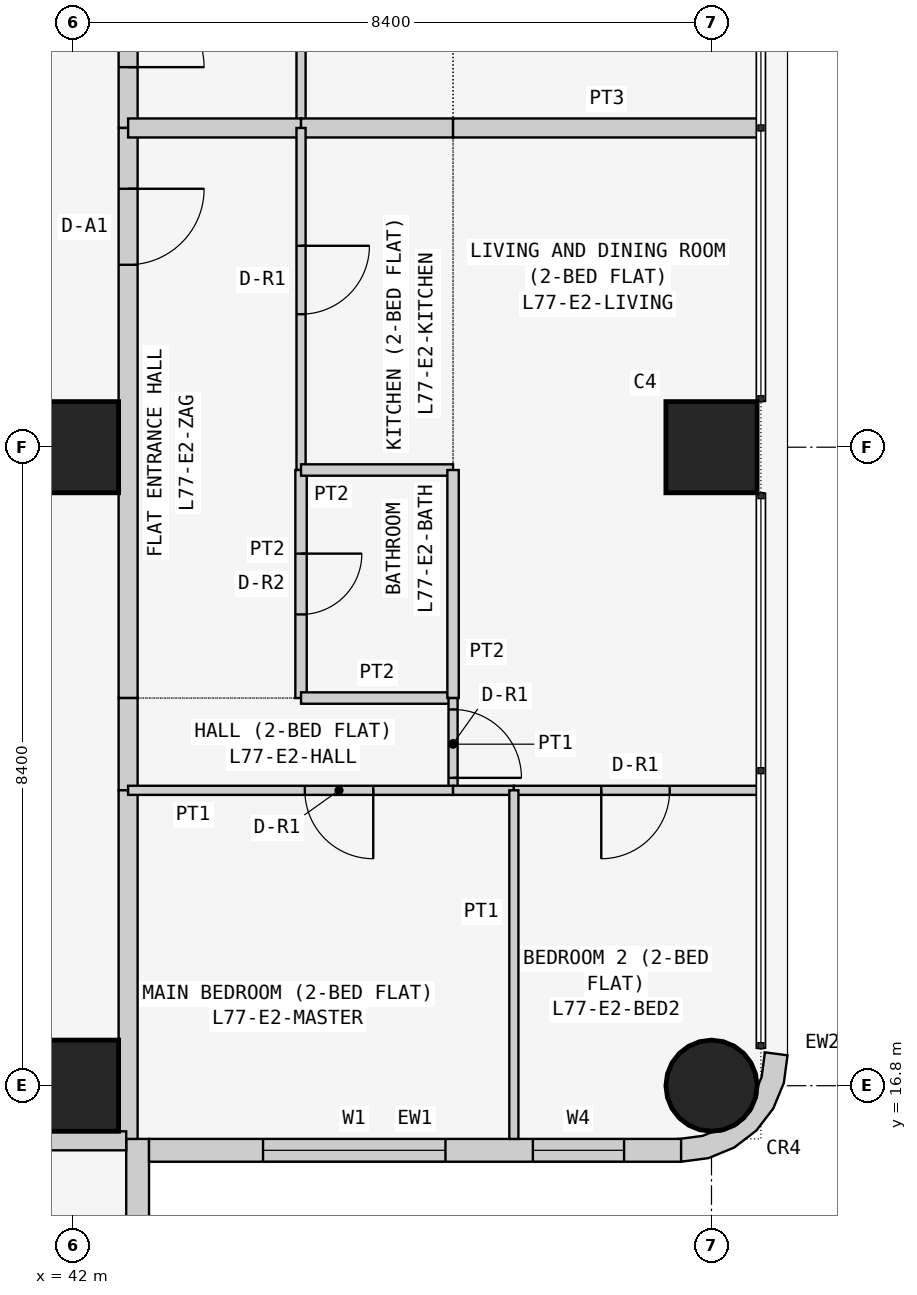
"""IFC4 building model, lengths in metres.
Left out: names, types, materials, properties, quantities, classifications, styles, units other than length and angle.
Written with IfcOpenShell. Run it as: python <this file> out.ifc"""

import sys

from ifc_helpers import new_model, si_unit, direction, frame, frame_2d, origin, origin_2d, place, context, subcontext, project, spatial, polyline, rectangle, circle, outline, extrude, element, fill, save


model = new_model("IFC4")
c1 = context("Model", 3, precision=1e-05, world=origin(), true_north=direction((0.0, 1.0)))
c2 = subcontext(c1, "Body", "Model", "MODEL_VIEW")
j1 = project(units=[si_unit("LENGTHUNIT", "METRE"), si_unit("PLANEANGLEUNIT", "RADIAN")], contexts=[c1])
p1 = place(None, origin())
s1 = spatial("IfcSite", under=j1, at=p1, CompositionType="ELEMENT")
p2 = place(p1, origin())
s2 = spatial("IfcBuilding", under=s1, at=p2, CompositionType="ELEMENT")
p3 = place(p2, frame((0.0, 0.0, 293.7)))
s3 = spatial("IfcBuildingStorey", under=s2, at=p3, CompositionType="ELEMENT", Elevation=293.7)
for number, where, z_axis, x_axis in (
    (1, (42.0, 16.8, 0.0), (0.0, 0.0, 1.0), (1.0, 0.0, 0.0)),
    (2, (42.0, 25.2, 0.0), (0.0, 0.0, 1.0), (1.0, 0.0, 0.0)),
):
    element("IfcColumn", number, at=place(p3, frame(where, z_axis=z_axis, x_axis=x_axis)), inside=s3, PredefinedType="COLUMN", context=c2, shape_type="SweptSolid", body=[
        extrude(rectangle(XDim=1.2, YDim=1.2, at=origin_2d()), origin(), (0.0, 0.0, 1.0), 3.6),
    ])
p4 = place(p3, frame((50.4, 16.8, 0.0), z_axis=(0.0, 0.0, 1.0), x_axis=(1.0, 0.0, 0.0)))
e3 = element("IfcColumn", 3, at=p4, inside=s3, PredefinedType="COLUMN", context=c2, shape_type="SweptSolid", body=[
    extrude(circle(Radius=0.6, at=origin_2d()), origin(), (0.0, 0.0, 1.0), 3.6),
])
p5 = place(p3, frame((50.4, 25.2, 0.0), z_axis=(0.0, 0.0, 1.0), x_axis=(1.0, 0.0, 0.0)))
e4 = element("IfcColumn", 4, at=p5, inside=s3, PredefinedType="COLUMN", context=c2, shape_type="SweptSolid", body=[
    extrude(rectangle(XDim=1.2, YDim=1.2, at=origin_2d()), origin(), (0.0, 0.0, 1.0), 3.6),
])
p6 = place(p3, frame((42.85, 8.8, 0.0), z_axis=(0.0, 0.0, 1.0), x_axis=(0.0, 1.0, 0.0)))
e5 = element("IfcWall", 5, at=p6, inside=s3, PredefinedType="SOLIDWALL", context=c2, shape_type="SweptSolid", body=[
    extrude(rectangle(XDim=7.3, YDim=0.3, at=frame_2d((3.65, 0.0))), origin(), (0.0, 0.0, 1.0), 3.45),
])
p7 = place(p6, frame((3.1, 0.0, 0.9)))
e6 = element("IfcOpeningElement", 6, at=p7, cuts=e5, PredefinedType="OPENING", context=c2, shape_type="SweptSolid", body=[
    extrude(rectangle(XDim=2.4, YDim=1.5, at=frame_2d((1.2, 0.75))), frame((0.0, 0.16, 0.0), z_axis=(0.0, -1.0, 0.0), x_axis=(1.0, 0.0, 0.0)), (0.0, 0.0, 1.0), 0.32),
])
p8 = place(p6, frame((0.75, 0.0, 0.9)))
e7 = element("IfcOpeningElement", 7, at=p8, cuts=e5, PredefinedType="OPENING", context=c2, shape_type="SweptSolid", body=[
    extrude(rectangle(XDim=1.2, YDim=1.5, at=frame_2d((0.6, 0.75))), frame((0.0, 0.16, 0.0), z_axis=(0.0, -1.0, 0.0), x_axis=(1.0, 0.0, 0.0)), (0.0, 0.0, 1.0), 0.32),
])
p9 = place(p3, frame((43.0, 15.95, 0.0), z_axis=(0.0, 0.0, 1.0), x_axis=(1.0, 0.0, 0.0)))
e8 = element("IfcWall", 8, at=p9, inside=s3, PredefinedType="SOLIDWALL", context=c2, shape_type="SweptSolid", body=[
    extrude(rectangle(XDim=7.0, YDim=0.3, at=frame_2d((3.5, 0.0))), origin(), (0.0, 0.0, 1.0), 3.45),
])
p10 = place(p9, frame((1.5, 0.0, 0.9)))
e9 = element("IfcOpeningElement", 9, at=p10, cuts=e8, PredefinedType="OPENING", context=c2, shape_type="SweptSolid", body=[
    extrude(rectangle(XDim=2.4, YDim=1.5, at=frame_2d((1.2, 0.75))), frame((0.0, 0.16, 0.0), z_axis=(0.0, -1.0, 0.0), x_axis=(1.0, 0.0, 0.0)), (0.0, 0.0, 1.0), 0.32),
])
p11 = place(p9, frame((5.05, 0.0, 0.9)))
e10 = element("IfcOpeningElement", 10, at=p11, cuts=e8, PredefinedType="OPENING", context=c2, shape_type="SweptSolid", body=[
    extrude(rectangle(XDim=1.2, YDim=1.5, at=frame_2d((0.6, 0.75))), frame((0.0, 0.16, 0.0), z_axis=(0.0, -1.0, 0.0), x_axis=(1.0, 0.0, 0.0)), (0.0, 0.0, 1.0), 0.32),
])
p12 = place(p3, frame((50.038, 16.224, 0.0), z_axis=(0.0, 0.0, 1.0), x_axis=(0.707106781187, -0.707106781187, 0.0)))
e11 = element("IfcWall", 11, at=p12, inside=s3, PredefinedType="SOLIDWALL", context=c2, shape_type="SweptSolid", body=[
    extrude(outline(polyline([(0.047, 1.455), (0.233, 1.212), (0.292, 1.069), (0.358, 1.003), (0.449, 0.782), (0.449, 0.543), (0.358, 0.322), (0.292, 0.257), (0.233, 0.114), (0.047, -0.129), (0.033, -0.143), (0.273, -0.327), (0.495, -0.037), (0.635, 0.301), (0.683, 0.663), (0.635, 1.025), (0.495, 1.363), (0.273, 1.653), (0.033, 1.469), (0.047, 1.455)])), origin(), (0.0, 0.0, 1.0), 3.45),
])
p13 = place(p3, frame((42.725, 36.9, 0.0), z_axis=(0.0, 0.0, 1.0), x_axis=(0.0, -1.0, 0.0)))
e12 = element("IfcWall", 12, at=p13, inside=s3, PredefinedType="PARTITIONING", context=c2, shape_type="SweptSolid", body=[
    extrude(rectangle(XDim=7.5, YDim=0.25, at=frame_2d((3.75, 0.0))), origin(), (0.0, 0.0, 1.0), 3.45),
])
p14 = place(p13, frame((5.7, 0.0, 0.0)))
e13 = element("IfcOpeningElement", 13, at=p14, cuts=e12, PredefinedType="OPENING", context=c2, shape_type="SweptSolid", body=[
    extrude(rectangle(XDim=1.0, YDim=2.1, at=frame_2d((0.5, 1.05))), frame((0.0, 0.135, 0.0), z_axis=(0.0, -1.0, 0.0), x_axis=(1.0, 0.0, 0.0)), (0.0, 0.0, 1.0), 0.27),
])
p15 = place(p3, frame((42.725, 29.4, 0.0), z_axis=(0.0, 0.0, 1.0), x_axis=(0.0, -1.0, 0.0)))
e14 = element("IfcWall", 14, at=p15, inside=s3, PredefinedType="PARTITIONING", context=c2, shape_type="SweptSolid", body=[
    extrude(rectangle(XDim=7.5, YDim=0.25, at=frame_2d((3.75, 0.0))), origin(), (0.0, 0.0, 1.0), 3.45),
])
p16 = place(p15, frame((0.8, 0.0, 0.0)))
e15 = element("IfcOpeningElement", 15, at=p16, cuts=e14, PredefinedType="OPENING", context=c2, shape_type="SweptSolid", body=[
    extrude(rectangle(XDim=1.0, YDim=2.1, at=frame_2d((0.5, 1.05))), frame((0.0, 0.135, 0.0), z_axis=(0.0, -1.0, 0.0), x_axis=(1.0, 0.0, 0.0)), (0.0, 0.0, 1.0), 0.27),
])
p17 = place(p3, frame((42.725, 21.9, 0.0), z_axis=(0.0, 0.0, 1.0), x_axis=(0.0, -1.0, 0.0)))
e16 = element("IfcWall", 16, at=p17, inside=s3, PredefinedType="PARTITIONING", context=c2, shape_type="SweptSolid", body=[
    extrude(rectangle(XDim=1.214, YDim=0.25, at=frame_2d((0.607, 0.0))), origin(), (0.0, 0.0, 1.0), 3.45),
])
p18 = place(p3, frame((42.725, 20.686, 0.0), z_axis=(0.0, 0.0, 1.0), x_axis=(0.0, -1.0, 0.0)))
e17 = element("IfcWall", 17, at=p18, inside=s3, PredefinedType="PARTITIONING", context=c2, shape_type="SweptSolid", body=[
    extrude(rectangle(XDim=4.586, YDim=0.25, at=frame_2d((2.293, 0.0))), origin(), (0.0, 0.0, 1.0), 3.45),
])
p19 = place(p3, frame((42.7, 16.075, 0.0), z_axis=(0.0, 0.0, 1.0), x_axis=(-1.0, 0.0, 0.0)))
e18 = element("IfcWall", 18, at=p19, inside=s3, PredefinedType="PARTITIONING", context=c2, shape_type="SweptSolid", body=[
    extrude(rectangle(XDim=6.871, YDim=0.25, at=frame_2d((3.436, 0.0))), origin(), (0.0, 0.0, 1.0), 3.45),
])
p20 = place(p3, frame((45.0, 29.4, 0.0), z_axis=(0.0, 0.0, 1.0), x_axis=(0.0, 1.0, 0.0)))
e19 = element("IfcWall", 19, at=p20, inside=s3, PredefinedType="PARTITIONING", context=c2, shape_type="SweptSolid", body=[
    extrude(rectangle(XDim=4.5, YDim=0.12, at=frame_2d((2.25, 0.0))), origin(), (0.0, 0.0, 1.0), 3.45),
])
p21 = place(p20, frame((1.55, 0.0, 0.0)))
e20 = element("IfcOpeningElement", 20, at=p21, cuts=e19, PredefinedType="OPENING", context=c2, shape_type="SweptSolid", body=[
    extrude(rectangle(XDim=0.9, YDim=2.1, at=frame_2d((0.45, 1.05))), frame((0.0, 0.07, 0.0), z_axis=(0.0, -1.0, 0.0), x_axis=(1.0, 0.0, 0.0)), (0.0, 0.0, 1.0), 0.14),
])
p22 = place(p3, frame((42.725, 29.4, 0.0), z_axis=(0.0, 0.0, 1.0), x_axis=(1.0, 0.0, 0.0)))
e21 = element("IfcWall", 21, at=p22, inside=s3, PredefinedType="PARTITIONING", context=c2, shape_type="SweptSolid", body=[
    extrude(rectangle(XDim=2.275, YDim=0.25, at=frame_2d((1.137, 0.0))), origin(), (0.0, 0.0, 1.0), 3.45),
])
p23 = place(p3, frame((45.0, 29.4, 0.0), z_axis=(0.0, 0.0, 1.0), x_axis=(1.0, 0.0, 0.0)))
e22 = element("IfcWall", 22, at=p23, inside=s3, PredefinedType="PARTITIONING", context=c2, shape_type="SweptSolid", body=[
    extrude(rectangle(XDim=2.0, YDim=0.25, at=frame_2d((1.0, 0.0))), origin(), (0.0, 0.0, 1.0), 3.45),
])
p24 = place(p3, frame((47.0, 29.4, 0.0), z_axis=(0.0, 0.0, 1.0), x_axis=(1.0, 0.0, 0.0)))
e23 = element("IfcWall", 23, at=p24, inside=s3, PredefinedType="PARTITIONING", context=c2, shape_type="SweptSolid", body=[
    extrude(rectangle(XDim=4.05, YDim=0.25, at=frame_2d((2.025, 0.0))), origin(), (0.0, 0.0, 1.0), 3.45),
])
p25 = place(p3, frame((45.0, 29.4, 0.0), z_axis=(0.0, 0.0, 1.0), x_axis=(0.0, -1.0, 0.0)))
e24 = element("IfcWall", 24, at=p25, inside=s3, PredefinedType="PARTITIONING", context=c2, shape_type="SweptSolid", body=[
    extrude(rectangle(XDim=4.5, YDim=0.12, at=frame_2d((2.25, 0.0))), origin(), (0.0, 0.0, 1.0), 3.45),
])
p26 = place(p25, frame((1.55, 0.0, 0.0)))
e25 = element("IfcOpeningElement", 25, at=p26, cuts=e24, PredefinedType="OPENING", context=c2, shape_type="SweptSolid", body=[
    extrude(rectangle(XDim=0.9, YDim=2.1, at=frame_2d((0.45, 1.05))), frame((0.0, 0.07, 0.0), z_axis=(0.0, -1.0, 0.0), x_axis=(1.0, 0.0, 0.0)), (0.0, 0.0, 1.0), 0.14),
])
p27 = place(p3, frame((45.0, 24.9, 0.0), z_axis=(0.0, 0.0, 1.0), x_axis=(0.0, -1.0, 0.0)))
e26 = element("IfcWall", 26, at=p27, inside=s3, PredefinedType="PARTITIONING", context=c2, shape_type="SweptSolid", body=[
    extrude(rectangle(XDim=3.0, YDim=0.15, at=frame_2d((1.5, 0.0))), origin(), (0.0, 0.0, 1.0), 3.45),
])
p28 = place(p27, frame((1.1, 0.0, 0.0)))
e27 = element("IfcOpeningElement", 27, at=p28, cuts=e26, PredefinedType="OPENING", context=c2, shape_type="SweptSolid", body=[
    extrude(rectangle(XDim=0.8, YDim=2.1, at=frame_2d((0.4, 1.05))), frame((0.0, 0.085, 0.0), z_axis=(0.0, -1.0, 0.0), x_axis=(1.0, 0.0, 0.0)), (0.0, 0.0, 1.0), 0.17),
])
for number, where, z_axis, x_axis in (
    (28, (47.0, 24.9, 0.0), (0.0, 0.0, 1.0), (-1.0, 0.0, 0.0)),
    (29, (47.0, 21.9, 0.0), (0.0, 0.0, 1.0), (-1.0, 0.0, 0.0)),
):
    element("IfcWall", number, at=place(p3, frame(where, z_axis=z_axis, x_axis=x_axis)), inside=s3, PredefinedType="PARTITIONING", context=c2, shape_type="SweptSolid", body=[
        extrude(rectangle(XDim=2.0, YDim=0.15, at=frame_2d((1.0, 0.0))), origin(), (0.0, 0.0, 1.0), 3.45),
    ])
p29 = place(p3, frame((47.0, 24.9, 0.0), z_axis=(0.0, 0.0, 1.0), x_axis=(0.0, -1.0, 0.0)))
e30 = element("IfcWall", 30, at=p29, inside=s3, PredefinedType="PARTITIONING", context=c2, shape_type="SweptSolid", body=[
    extrude(rectangle(XDim=3.0, YDim=0.15, at=frame_2d((1.5, 0.0))), origin(), (0.0, 0.0, 1.0), 3.45),
])
p30 = place(p3, frame((47.0, 21.9, 0.0), z_axis=(0.0, 0.0, 1.0), x_axis=(0.0, -1.0, 0.0)))
e31 = element("IfcWall", 31, at=p30, inside=s3, PredefinedType="PARTITIONING", context=c2, shape_type="SweptSolid", body=[
    extrude(rectangle(XDim=1.214, YDim=0.12, at=frame_2d((0.607, 0.0))), origin(), (0.0, 0.0, 1.0), 3.45),
])
p31 = place(p30, frame((0.15, 0.0, 0.0)))
e32 = element("IfcOpeningElement", 32, at=p31, cuts=e31, PredefinedType="OPENING", context=c2, shape_type="SweptSolid", body=[
    extrude(rectangle(XDim=0.9, YDim=2.1, at=frame_2d((0.45, 1.05))), frame((0.0, 0.07, 0.0), z_axis=(0.0, -1.0, 0.0), x_axis=(1.0, 0.0, 0.0)), (0.0, 0.0, 1.0), 0.14),
])
p32 = place(p3, frame((47.0, 20.686, 0.0), z_axis=(0.0, 0.0, 1.0), x_axis=(-1.0, 0.0, 0.0)))
e33 = element("IfcWall", 33, at=p32, inside=s3, PredefinedType="PARTITIONING", context=c2, shape_type="SweptSolid", body=[
    extrude(rectangle(XDim=4.275, YDim=0.12, at=frame_2d((2.137, 0.0))), origin(), (0.0, 0.0, 1.0), 3.45),
])
p33 = place(p32, frame((1.05, 0.0, 0.0)))
e34 = element("IfcOpeningElement", 34, at=p33, cuts=e33, PredefinedType="OPENING", context=c2, shape_type="SweptSolid", body=[
    extrude(rectangle(XDim=0.9, YDim=2.1, at=frame_2d((0.45, 1.05))), frame((0.0, 0.07, 0.0), z_axis=(0.0, -1.0, 0.0), x_axis=(1.0, 0.0, 0.0)), (0.0, 0.0, 1.0), 0.14),
])
p34 = place(p3, frame((47.8, 20.686, 0.0), z_axis=(0.0, 0.0, 1.0), x_axis=(-1.0, 0.0, 0.0)))
e35 = element("IfcWall", 35, at=p34, inside=s3, PredefinedType="PARTITIONING", context=c2, shape_type="SweptSolid", body=[
    extrude(rectangle(XDim=0.8, YDim=0.12, at=frame_2d((0.4, 0.0))), origin(), (0.0, 0.0, 1.0), 3.45),
])
p35 = place(p3, frame((51.05, 20.686, 0.0), z_axis=(0.0, 0.0, 1.0), x_axis=(-1.0, 0.0, 0.0)))
e36 = element("IfcWall", 36, at=p35, inside=s3, PredefinedType="PARTITIONING", context=c2, shape_type="SweptSolid", body=[
    extrude(rectangle(XDim=3.25, YDim=0.12, at=frame_2d((1.625, 0.0))), origin(), (0.0, 0.0, 1.0), 3.45),
])
p36 = place(p35, frame((1.2, 0.0, 0.0)))
e37 = element("IfcOpeningElement", 37, at=p36, cuts=e36, PredefinedType="OPENING", context=c2, shape_type="SweptSolid", body=[
    extrude(rectangle(XDim=0.9, YDim=2.1, at=frame_2d((0.45, 1.05))), frame((0.0, 0.07, 0.0), z_axis=(0.0, -1.0, 0.0), x_axis=(1.0, 0.0, 0.0)), (0.0, 0.0, 1.0), 0.14),
])
p37 = place(p3, frame((47.8, 20.686, 0.0), z_axis=(0.0, 0.0, 1.0), x_axis=(0.0, -1.0, 0.0)))
e38 = element("IfcWall", 38, at=p37, inside=s3, PredefinedType="PARTITIONING", context=c2, shape_type="SweptSolid", body=[
    extrude(rectangle(XDim=4.586, YDim=0.12, at=frame_2d((2.293, 0.0))), origin(), (0.0, 0.0, 1.0), 3.45),
])
p38 = place(p10, origin())
e39 = element("IfcWindow", 39, at=p38, inside=s3, PartitioningType="SINGLE_PANEL", PredefinedType="WINDOW", context=c2, shape_type="SweptSolid", body=[
    extrude(rectangle(XDim=2.4, YDim=1.5, at=frame_2d((1.2, 0.75))), frame((0.0, 0.03, 0.0), z_axis=(0.0, -1.0, 0.0), x_axis=(1.0, 0.0, 0.0)), (0.0, 0.0, 1.0), 0.06),
])
fill(e9, e39)
p39 = place(p11, origin())
e40 = element("IfcWindow", 40, at=p39, inside=s3, PartitioningType="SINGLE_PANEL", PredefinedType="WINDOW", context=c2, shape_type="SweptSolid", body=[
    extrude(rectangle(XDim=1.2, YDim=1.5, at=frame_2d((0.6, 0.75))), frame((0.0, 0.03, 0.0), z_axis=(0.0, -1.0, 0.0), x_axis=(1.0, 0.0, 0.0)), (0.0, 0.0, 1.0), 0.06),
])
fill(e10, e40)
p40 = place(p14, origin())
e41 = element("IfcDoor", 41, at=p40, inside=s3, OperationType="SINGLE_SWING_RIGHT", PredefinedType="DOOR", context=c2, shape_type="SweptSolid", body=[
    extrude(rectangle(XDim=1.0, YDim=2.1, at=frame_2d((0.5, 1.05))), frame((0.0, 0.025, 0.0), z_axis=(0.0, -1.0, 0.0), x_axis=(1.0, 0.0, 0.0)), (0.0, 0.0, 1.0), 0.05),
])
fill(e13, e41)
p41 = place(p16, origin())
e42 = element("IfcDoor", 42, at=p41, inside=s3, OperationType="SINGLE_SWING_LEFT", PredefinedType="DOOR", context=c2, shape_type="SweptSolid", body=[
    extrude(rectangle(XDim=1.0, YDim=2.1, at=frame_2d((0.5, 1.05))), frame((0.0, 0.025, 0.0), z_axis=(0.0, -1.0, 0.0), x_axis=(1.0, 0.0, 0.0)), (0.0, 0.0, 1.0), 0.05),
])
fill(e15, e42)
p42 = place(p26, origin())
e43 = element("IfcDoor", 43, at=p42, inside=s3, OperationType="SINGLE_SWING_LEFT", PredefinedType="DOOR", context=c2, shape_type="SweptSolid", body=[
    extrude(rectangle(XDim=0.9, YDim=2.1, at=frame_2d((0.45, 1.05))), frame((0.0, 0.025, 0.0), z_axis=(0.0, -1.0, 0.0), x_axis=(1.0, 0.0, 0.0)), (0.0, 0.0, 1.0), 0.05),
])
fill(e25, e43)
p43 = place(p28, origin())
e44 = element("IfcDoor", 44, at=p43, inside=s3, OperationType="SINGLE_SWING_LEFT", PredefinedType="DOOR", context=c2, shape_type="SweptSolid", body=[
    extrude(rectangle(XDim=0.8, YDim=2.1, at=frame_2d((0.4, 1.05))), frame((0.0, 0.025, 0.0), z_axis=(0.0, -1.0, 0.0), x_axis=(1.0, 0.0, 0.0)), (0.0, 0.0, 1.0), 0.05),
])
fill(e27, e44)
p44 = place(p31, origin())
e45 = element("IfcDoor", 45, at=p44, inside=s3, OperationType="SINGLE_SWING_RIGHT", PredefinedType="DOOR", context=c2, shape_type="SweptSolid", body=[
    extrude(rectangle(XDim=0.9, YDim=2.1, at=frame_2d((0.45, 1.05))), frame((0.0, 0.025, 0.0), z_axis=(0.0, -1.0, 0.0), x_axis=(1.0, 0.0, 0.0)), (0.0, 0.0, 1.0), 0.05),
])
fill(e32, e45)
p45 = place(p33, origin())
e46 = element("IfcDoor", 46, at=p45, inside=s3, OperationType="SINGLE_SWING_LEFT", PredefinedType="DOOR", context=c2, shape_type="SweptSolid", body=[
    extrude(rectangle(XDim=0.9, YDim=2.1, at=frame_2d((0.45, 1.05))), frame((0.0, 0.025, 0.0), z_axis=(0.0, -1.0, 0.0), x_axis=(1.0, 0.0, 0.0)), (0.0, 0.0, 1.0), 0.05),
])
fill(e34, e46)
p46 = place(p36, origin())
e47 = element("IfcDoor", 47, at=p46, inside=s3, OperationType="SINGLE_SWING_RIGHT", PredefinedType="DOOR", context=c2, shape_type="SweptSolid", body=[
    extrude(rectangle(XDim=0.9, YDim=2.1, at=frame_2d((0.45, 1.05))), frame((0.0, 0.025, 0.0), z_axis=(0.0, -1.0, 0.0), x_axis=(1.0, 0.0, 0.0)), (0.0, 0.0, 1.0), 0.05),
])
fill(e37, e47)
save(model, sys.argv[1])
